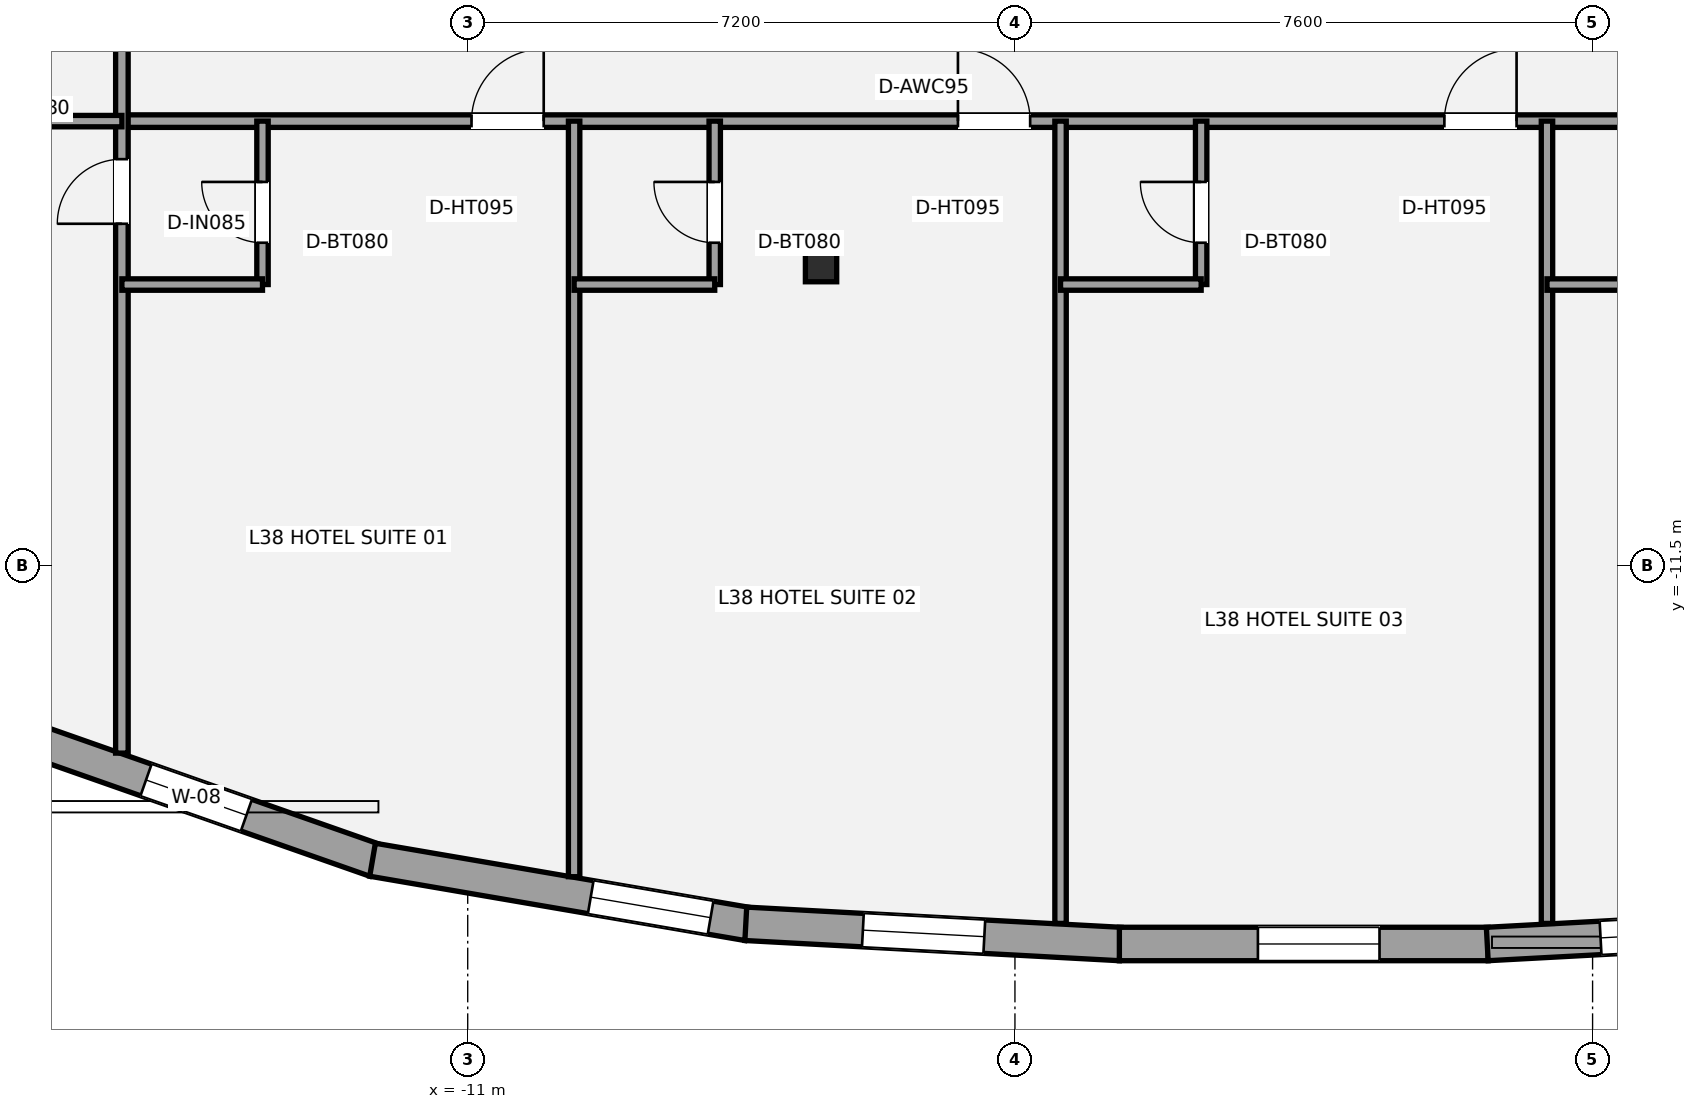
"""IFC4 building model, lengths in metres.
Left out: names, types, materials, properties, quantities, classifications, styles, units other than length and angle.
Written with IfcOpenShell. Run it as: python <this file> out.ifc"""

import sys

from ifc_helpers import new_model, si_unit, direction, frame, frame_2d, origin, origin_2d, place, context, subcontext, project, spatial, rectangle, i_section, extrude, element, fill, save


model = new_model("IFC4")
c1 = context("Model", 3, precision=1e-05, world=origin(), true_north=direction((0.0, 1.0)))
c2 = subcontext(c1, "Body", "Model", "MODEL_VIEW")
j1 = project(units=[si_unit("LENGTHUNIT", "METRE"), si_unit("PLANEANGLEUNIT", "RADIAN")], contexts=[c1])
p1 = place(None, origin())
s1 = spatial("IfcSite", under=j1, at=p1, CompositionType="ELEMENT")
p2 = place(p1, origin())
s2 = spatial("IfcBuilding", under=s1, at=p2, CompositionType="ELEMENT")
p3 = place(p2, frame((0.0, 0.0, 143.8)))
s3 = spatial("IfcBuildingStorey", under=s2, at=p3, CompositionType="ELEMENT", Elevation=143.8)
p4 = place(p3, frame((-6.351, -7.546, 0.0), z_axis=(0.0, 0.0, 1.0), x_axis=(1.0, 0.0, 0.0)))
e1 = element("IfcColumn", 1, at=p4, inside=s3, PredefinedType="COLUMN", context=c2, shape_type="SweptSolid", body=[
    extrude(i_section(OverallWidth=0.412, OverallDepth=0.435, WebThickness=0.036, FlangeThickness=0.057, at=origin_2d()), origin(), (0.0, 0.0, 1.0), 3.2),
])
p5 = place(p3, frame((-12.216, -15.377, 0.0), z_axis=(0.0, 0.0, 1.0), x_axis=(-0.943528860281, 0.331290340662, 0.0)))
e2 = element("IfcWall", 2, at=p5, inside=s3, PredefinedType="STANDARD", context=c2, shape_type="SweptSolid", body=[
    extrude(rectangle(XDim=4.893, YDim=0.44, at=frame_2d((2.447, 0.0))), origin(), (0.0, 0.0, 1.0), 2.315),
])
p6 = place(p5, frame((1.796, 0.0, 0.58)))
e3 = element("IfcOpeningElement", 3, at=p6, cuts=e2, PredefinedType="OPENING", context=c2, shape_type="SweptSolid", body=[
    extrude(rectangle(XDim=1.4, YDim=1.55, at=frame_2d((0.7, 0.775))), frame((0.0, 0.23, 0.0), z_axis=(0.0, -1.0, 0.0), x_axis=(1.0, 0.0, 0.0)), (0.0, 0.0, 1.0), 0.46),
])
p7 = place(p3, frame((-7.316, -16.213, 0.0), z_axis=(0.0, 0.0, 1.0), x_axis=(-0.985640803986, 0.168855575915, 0.0)))
e4 = element("IfcWall", 4, at=p7, inside=s3, PredefinedType="STANDARD", context=c2, shape_type="SweptSolid", body=[
    extrude(rectangle(XDim=5.009, YDim=0.44, at=frame_2d((2.504, 0.0))), origin(), (0.0, 0.0, 1.0), 2.315),
])
p8 = place(p7, frame((0.496, 0.0, 0.58)))
e5 = element("IfcOpeningElement", 5, at=p8, cuts=e4, PredefinedType="OPENING", context=c2, shape_type="SweptSolid", body=[
    extrude(rectangle(XDim=1.6, YDim=1.55, at=frame_2d((0.8, 0.775))), frame((0.0, 0.23, 0.0), z_axis=(0.0, -1.0, 0.0), x_axis=(1.0, 0.0, 0.0)), (0.0, 0.0, 1.0), 0.46),
])
p9 = place(p3, frame((-2.414, -16.476, 0.0), z_axis=(0.0, 0.0, 1.0), x_axis=(-0.998547098553, 0.05388591627, 0.0)))
e6 = element("IfcWall", 6, at=p9, inside=s3, PredefinedType="STANDARD", context=c2, shape_type="SweptSolid", body=[
    extrude(rectangle(XDim=4.934, YDim=0.44, at=frame_2d((2.467, 0.0))), origin(), (0.0, 0.0, 1.0), 2.315),
])
p10 = place(p9, frame((1.792, 0.0, 0.58)))
e7 = element("IfcOpeningElement", 7, at=p10, cuts=e6, PredefinedType="OPENING", context=c2, shape_type="SweptSolid", body=[
    extrude(rectangle(XDim=1.6, YDim=1.55, at=frame_2d((0.8, 0.775))), frame((0.0, 0.23, 0.0), z_axis=(0.0, -1.0, 0.0), x_axis=(1.0, 0.0, 0.0)), (0.0, 0.0, 1.0), 0.46),
])
p11 = place(p3, frame((2.426, -16.476, 0.0), z_axis=(0.0, 0.0, 1.0), x_axis=(-1.0, 0.0, 0.0)))
e8 = element("IfcWall", 8, at=p11, inside=s3, PredefinedType="STANDARD", context=c2, shape_type="SweptSolid", body=[
    extrude(rectangle(XDim=4.852, YDim=0.44, at=frame_2d((2.426, 0.0))), origin(), (0.0, 0.0, 1.0), 2.315),
])
p12 = place(p11, frame((1.429, 0.0, 0.58)))
e9 = element("IfcOpeningElement", 9, at=p12, cuts=e8, PredefinedType="OPENING", context=c2, shape_type="SweptSolid", body=[
    extrude(rectangle(XDim=1.6, YDim=1.55, at=frame_2d((0.8, 0.775))), frame((0.0, 0.23, 0.0), z_axis=(0.0, -1.0, 0.0), x_axis=(1.0, 0.0, 0.0)), (0.0, 0.0, 1.0), 0.46),
])
p13 = place(p3, frame((7.341, -16.21, 0.0), z_axis=(0.0, 0.0, 1.0), x_axis=(-0.998547098553, -0.05388591627, 0.0)))
e10 = element("IfcWall", 10, at=p13, inside=s3, PredefinedType="STANDARD", context=c2, shape_type="SweptSolid", body=[
    extrude(rectangle(XDim=4.934, YDim=0.44, at=frame_2d((2.467, 0.0))), origin(), (0.0, 0.0, 1.0), 2.315),
])
p14 = place(p13, frame((1.841, 0.0, 0.58)))
e11 = element("IfcOpeningElement", 11, at=p14, cuts=e10, PredefinedType="OPENING", context=c2, shape_type="SweptSolid", body=[
    extrude(rectangle(XDim=1.6, YDim=1.55, at=frame_2d((0.8, 0.775))), frame((0.0, 0.23, 0.0), z_axis=(0.0, -1.0, 0.0), x_axis=(1.0, 0.0, 0.0)), (0.0, 0.0, 1.0), 0.46),
])
p15 = place(p3, frame((-15.55, -5.65, 0.0), z_axis=(0.0, 0.0, 1.0), x_axis=(1.0, 0.0, 0.0)))
e12 = element("IfcWall", 12, at=p15, inside=s3, PredefinedType="PARTITIONING", context=c2, shape_type="SweptSolid", body=[
    extrude(rectangle(XDim=31.1, YDim=0.165, at=frame_2d((15.55, 0.0))), origin(), (0.0, 0.0, 1.0), 2.398),
])
p16 = place(p15, frame((4.6, 0.0, 0.0)))
e13 = element("IfcOpeningElement", 13, at=p16, cuts=e12, PredefinedType="OPENING", context=c2, shape_type="SweptSolid", body=[
    extrude(rectangle(XDim=0.95, YDim=2.15, at=frame_2d((0.475, 1.075))), frame((0.0, 0.093, 0.0), z_axis=(0.0, -1.0, 0.0), x_axis=(1.0, 0.0, 0.0)), (0.0, 0.0, 1.0), 0.185),
])
p17 = place(p15, frame((11.0, 0.0, 0.0)))
e14 = element("IfcOpeningElement", 14, at=p17, cuts=e12, PredefinedType="OPENING", context=c2, shape_type="SweptSolid", body=[
    extrude(rectangle(XDim=0.95, YDim=2.15, at=frame_2d((0.475, 1.075))), frame((0.0, 0.093, 0.0), z_axis=(0.0, -1.0, 0.0), x_axis=(1.0, 0.0, 0.0)), (0.0, 0.0, 1.0), 0.185),
])
p18 = place(p15, frame((17.4, 0.0, 0.0)))
e15 = element("IfcOpeningElement", 15, at=p18, cuts=e12, PredefinedType="OPENING", context=c2, shape_type="SweptSolid", body=[
    extrude(rectangle(XDim=0.95, YDim=2.15, at=frame_2d((0.475, 1.075))), frame((0.0, 0.093, 0.0), z_axis=(0.0, -1.0, 0.0), x_axis=(1.0, 0.0, 0.0)), (0.0, 0.0, 1.0), 0.185),
])
p19 = place(p15, frame((23.8, 0.0, 0.0)))
e16 = element("IfcOpeningElement", 16, at=p19, cuts=e12, PredefinedType="OPENING", context=c2, shape_type="SweptSolid", body=[
    extrude(rectangle(XDim=0.95, YDim=2.15, at=frame_2d((0.475, 1.075))), frame((0.0, 0.093, 0.0), z_axis=(0.0, -1.0, 0.0), x_axis=(1.0, 0.0, 0.0)), (0.0, 0.0, 1.0), 0.185),
])
p20 = place(p15, frame((29.75, 0.0, 0.0)))
e17 = element("IfcOpeningElement", 17, at=p20, cuts=e12, PredefinedType="OPENING", context=c2, shape_type="SweptSolid", body=[
    extrude(rectangle(XDim=0.95, YDim=2.15, at=frame_2d((0.475, 1.075))), frame((0.0, 0.093, 0.0), z_axis=(0.0, -1.0, 0.0), x_axis=(1.0, 0.0, 0.0)), (0.0, 0.0, 1.0), 0.185),
])
p21 = place(p3, frame((-15.55, -13.965, 0.0), z_axis=(0.0, 0.0, 1.0), x_axis=(0.0, 1.0, 0.0)))
e18 = element("IfcWall", 18, at=p21, inside=s3, PredefinedType="PARTITIONING", context=c2, shape_type="SweptSolid", body=[
    extrude(rectangle(XDim=21.515, YDim=0.165, at=frame_2d((10.757, 0.0))), origin(), (0.0, 0.0, 1.0), 2.473),
])
p22 = place(p21, frame((6.964, 0.0, 0.0)))
e19 = element("IfcOpeningElement", 19, at=p22, cuts=e18, PredefinedType="OPENING", context=c2, shape_type="SweptSolid", body=[
    extrude(rectangle(XDim=0.85, YDim=2.1, at=frame_2d((0.425, 1.05))), frame((0.0, 0.093, 0.0), z_axis=(0.0, -1.0, 0.0), x_axis=(1.0, 0.0, 0.0)), (0.0, 0.0, 1.0), 0.185),
])
p23 = place(p21, frame((11.014, 0.0, 0.0)))
e20 = element("IfcOpeningElement", 20, at=p23, cuts=e18, PredefinedType="OPENING", context=c2, shape_type="SweptSolid", body=[
    extrude(rectangle(XDim=0.95, YDim=2.15, at=frame_2d((0.475, 1.075))), frame((0.0, 0.093, 0.0), z_axis=(0.0, -1.0, 0.0), x_axis=(1.0, 0.0, 0.0)), (0.0, 0.0, 1.0), 0.185),
])
p24 = place(p21, frame((15.414, 0.0, 0.0)))
e21 = element("IfcOpeningElement", 21, at=p24, cuts=e18, PredefinedType="OPENING", context=c2, shape_type="SweptSolid", body=[
    extrude(rectangle(XDim=0.95, YDim=2.15, at=frame_2d((0.475, 1.075))), frame((0.0, 0.093, 0.0), z_axis=(0.0, -1.0, 0.0), x_axis=(1.0, 0.0, 0.0)), (0.0, 0.0, 1.0), 0.185),
])
p25 = place(p21, frame((20.165, 0.0, 0.0)))
e22 = element("IfcOpeningElement", 22, at=p25, cuts=e18, PredefinedType="OPENING", context=c2, shape_type="SweptSolid", body=[
    extrude(rectangle(XDim=0.95, YDim=2.15, at=frame_2d((0.475, 1.075))), frame((0.0, 0.093, 0.0), z_axis=(0.0, -1.0, 0.0), x_axis=(1.0, 0.0, 0.0)), (0.0, 0.0, 1.0), 0.185),
])
p26 = place(p3, frame((-23.513, -5.65, 0.0), z_axis=(0.0, 0.0, 1.0), x_axis=(1.0, 0.0, 0.0)))
e23 = element("IfcWall", 23, at=p26, inside=s3, PredefinedType="PLUMBINGWALL", context=c2, shape_type="SweptSolid", body=[
    extrude(rectangle(XDim=7.963, YDim=0.15, at=frame_2d((3.981, 0.0))), origin(), (0.0, 0.0, 1.0), 2.473),
])
p27 = place(p3, frame((-9.6, -15.591, 0.0), z_axis=(0.0, 0.0, 1.0), x_axis=(0.0, 1.0, 0.0)))
e24 = element("IfcWall", 24, at=p27, inside=s3, PredefinedType="PLUMBINGWALL", context=c2, shape_type="SweptSolid", body=[
    extrude(rectangle(XDim=9.941, YDim=0.15, at=frame_2d((4.97, 0.0))), origin(), (0.0, 0.0, 1.0), 3.02),
])
for number, where, z_axis, x_axis in (
    (25, (-3.2, -16.205, 0.0), (0.0, 0.0, 1.0), (0.0, 1.0, 0.0)),
    (26, (3.2, -16.205, 0.0), (0.0, 0.0, 1.0), (0.0, 1.0, 0.0)),
):
    element("IfcWall", number, at=place(p3, frame(where, z_axis=z_axis, x_axis=x_axis)), inside=s3, PredefinedType="PLUMBINGWALL", context=c2, shape_type="SweptSolid", body=[
        extrude(rectangle(XDim=10.555, YDim=0.15, at=frame_2d((5.278, 0.0))), origin(), (0.0, 0.0, 1.0), 2.473),
    ])
p28 = place(p3, frame((-13.7, -7.8, 0.0), z_axis=(0.0, 0.0, 1.0), x_axis=(0.0, 1.0, 0.0)))
e27 = element("IfcWall", 27, at=p28, inside=s3, PredefinedType="PLUMBINGWALL", context=c2, shape_type="SweptSolid", body=[
    extrude(rectangle(XDim=2.15, YDim=0.15, at=frame_2d((1.075, 0.0))), origin(), (0.0, 0.0, 1.0), 3.02),
])
p29 = place(p28, frame((0.55, 0.0, 0.0)))
e28 = element("IfcOpeningElement", 28, at=p29, cuts=e27, PredefinedType="OPENING", context=c2, shape_type="SweptSolid", body=[
    extrude(rectangle(XDim=0.8, YDim=2.1, at=frame_2d((0.4, 1.05))), frame((0.0, 0.085, 0.0), z_axis=(0.0, -1.0, 0.0), x_axis=(1.0, 0.0, 0.0)), (0.0, 0.0, 1.0), 0.17),
])
p30 = place(p3, frame((-15.55, -7.8, 0.0), z_axis=(0.0, 0.0, 1.0), x_axis=(1.0, 0.0, 0.0)))
e29 = element("IfcWall", 29, at=p30, inside=s3, PredefinedType="PLUMBINGWALL", context=c2, shape_type="SweptSolid", body=[
    extrude(rectangle(XDim=1.85, YDim=0.15, at=frame_2d((0.925, 0.0))), origin(), (0.0, 0.0, 1.0), 3.02),
])
p31 = place(p3, frame((-7.75, -7.8, 0.0), z_axis=(0.0, 0.0, 1.0), x_axis=(0.0, 1.0, 0.0)))
e30 = element("IfcWall", 30, at=p31, inside=s3, PredefinedType="PLUMBINGWALL", context=c2, shape_type="SweptSolid", body=[
    extrude(rectangle(XDim=2.15, YDim=0.15, at=frame_2d((1.075, 0.0))), origin(), (0.0, 0.0, 1.0), 3.02),
])
p32 = place(p31, frame((0.55, 0.0, 0.0)))
e31 = element("IfcOpeningElement", 31, at=p32, cuts=e30, PredefinedType="OPENING", context=c2, shape_type="SweptSolid", body=[
    extrude(rectangle(XDim=0.8, YDim=2.1, at=frame_2d((0.4, 1.05))), frame((0.0, 0.085, 0.0), z_axis=(0.0, -1.0, 0.0), x_axis=(1.0, 0.0, 0.0)), (0.0, 0.0, 1.0), 0.17),
])
p33 = place(p3, frame((-9.6, -7.8, 0.0), z_axis=(0.0, 0.0, 1.0), x_axis=(1.0, 0.0, 0.0)))
e32 = element("IfcWall", 32, at=p33, inside=s3, PredefinedType="PLUMBINGWALL", context=c2, shape_type="SweptSolid", body=[
    extrude(rectangle(XDim=1.85, YDim=0.15, at=frame_2d((0.925, 0.0))), origin(), (0.0, 0.0, 1.0), 3.02),
])
p34 = place(p3, frame((-1.35, -7.8, 0.0), z_axis=(0.0, 0.0, 1.0), x_axis=(0.0, 1.0, 0.0)))
e33 = element("IfcWall", 33, at=p34, inside=s3, PredefinedType="PLUMBINGWALL", context=c2, shape_type="SweptSolid", body=[
    extrude(rectangle(XDim=2.15, YDim=0.15, at=frame_2d((1.075, 0.0))), origin(), (0.0, 0.0, 1.0), 2.473),
])
p35 = place(p34, frame((0.55, 0.0, 0.0)))
e34 = element("IfcOpeningElement", 34, at=p35, cuts=e33, PredefinedType="OPENING", context=c2, shape_type="SweptSolid", body=[
    extrude(rectangle(XDim=0.8, YDim=2.1, at=frame_2d((0.4, 1.05))), frame((0.0, 0.085, 0.0), z_axis=(0.0, -1.0, 0.0), x_axis=(1.0, 0.0, 0.0)), (0.0, 0.0, 1.0), 0.17),
])
p36 = place(p3, frame((-3.2, -7.8, 0.0), z_axis=(0.0, 0.0, 1.0), x_axis=(1.0, 0.0, 0.0)))
e35 = element("IfcWall", 35, at=p36, inside=s3, PredefinedType="PLUMBINGWALL", context=c2, shape_type="SweptSolid", body=[
    extrude(rectangle(XDim=1.85, YDim=0.15, at=frame_2d((0.925, 0.0))), origin(), (0.0, 0.0, 1.0), 3.02),
])
p37 = place(p3, frame((3.2, -7.8, 0.0), z_axis=(0.0, 0.0, 1.0), x_axis=(1.0, 0.0, 0.0)))
e36 = element("IfcWall", 36, at=p37, inside=s3, PredefinedType="PLUMBINGWALL", context=c2, shape_type="SweptSolid", body=[
    extrude(rectangle(XDim=1.85, YDim=0.15, at=frame_2d((0.925, 0.0))), origin(), (0.0, 0.0, 1.0), 3.02),
])
p38 = place(p6, origin())
e37 = element("IfcWindow", 37, at=p38, inside=s3, PartitioningType="SINGLE_PANEL", PredefinedType="WINDOW", context=c2, shape_type="SweptSolid", body=[
    extrude(rectangle(XDim=1.4, YDim=1.55, at=frame_2d((0.7, 0.775))), frame((0.0, -0.01, 0.0), z_axis=(0.0, -1.0, 0.0), x_axis=(1.0, 0.0, 0.0)), (0.0, 0.0, 1.0), 0.06),
])
fill(e3, e37)
p39 = place(p8, origin())
e38 = element("IfcWindow", 38, at=p39, inside=s3, PartitioningType="SINGLE_PANEL", PredefinedType="WINDOW", context=c2, shape_type="SweptSolid", body=[
    extrude(rectangle(XDim=1.6, YDim=1.55, at=frame_2d((0.8, 0.775))), frame((0.0, -0.01, 0.0), z_axis=(0.0, -1.0, 0.0), x_axis=(1.0, 0.0, 0.0)), (0.0, 0.0, 1.0), 0.06),
])
fill(e5, e38)
p40 = place(p10, origin())
e39 = element("IfcWindow", 39, at=p40, inside=s3, PartitioningType="SINGLE_PANEL", PredefinedType="WINDOW", context=c2, shape_type="SweptSolid", body=[
    extrude(rectangle(XDim=1.6, YDim=1.55, at=frame_2d((0.8, 0.775))), frame((0.0, -0.01, 0.0), z_axis=(0.0, -1.0, 0.0), x_axis=(1.0, 0.0, 0.0)), (0.0, 0.0, 1.0), 0.06),
])
fill(e7, e39)
p41 = place(p12, origin())
e40 = element("IfcWindow", 40, at=p41, inside=s3, PartitioningType="SINGLE_PANEL", PredefinedType="WINDOW", context=c2, shape_type="SweptSolid", body=[
    extrude(rectangle(XDim=1.6, YDim=1.55, at=frame_2d((0.8, 0.775))), frame((0.0, -0.01, 0.0), z_axis=(0.0, -1.0, 0.0), x_axis=(1.0, 0.0, 0.0)), (0.0, 0.0, 1.0), 0.06),
])
fill(e9, e40)
p42 = place(p14, origin())
e41 = element("IfcWindow", 41, at=p42, inside=s3, PartitioningType="SINGLE_PANEL", PredefinedType="WINDOW", context=c2, shape_type="SweptSolid", body=[
    extrude(rectangle(XDim=1.6, YDim=1.55, at=frame_2d((0.8, 0.775))), frame((0.0, -0.01, 0.0), z_axis=(0.0, -1.0, 0.0), x_axis=(1.0, 0.0, 0.0)), (0.0, 0.0, 1.0), 0.06),
])
fill(e11, e41)
p43 = place(p22, origin())
e42 = element("IfcDoor", 42, at=p43, inside=s3, OperationType="SINGLE_SWING_LEFT", PredefinedType="DOOR", context=c2, shape_type="SweptSolid", body=[
    extrude(rectangle(XDim=0.85, YDim=2.1, at=frame_2d((0.425, 1.05))), frame((0.0, 0.025, 0.0), z_axis=(0.0, -1.0, 0.0), x_axis=(1.0, 0.0, 0.0)), (0.0, 0.0, 1.0), 0.05),
])
fill(e19, e42)
p44 = place(p16, origin())
e43 = element("IfcDoor", 43, at=p44, inside=s3, OperationType="SINGLE_SWING_RIGHT", PredefinedType="DOOR", context=c2, shape_type="SweptSolid", body=[
    extrude(rectangle(XDim=0.95, YDim=2.15, at=frame_2d((0.475, 1.075))), frame((0.0, 0.025, 0.0), z_axis=(0.0, -1.0, 0.0), x_axis=(1.0, 0.0, 0.0)), (0.0, 0.0, 1.0), 0.05),
])
fill(e13, e43)
p45 = place(p29, origin())
e44 = element("IfcDoor", 44, at=p45, inside=s3, OperationType="SINGLE_SWING_RIGHT", PredefinedType="DOOR", context=c2, shape_type="SweptSolid", body=[
    extrude(rectangle(XDim=0.8, YDim=2.1, at=frame_2d((0.4, 1.05))), frame((0.0, 0.025, 0.0), z_axis=(0.0, -1.0, 0.0), x_axis=(1.0, 0.0, 0.0)), (0.0, 0.0, 1.0), 0.05),
])
fill(e28, e44)
p46 = place(p17, origin())
e45 = element("IfcDoor", 45, at=p46, inside=s3, OperationType="SINGLE_SWING_LEFT", PredefinedType="DOOR", context=c2, shape_type="SweptSolid", body=[
    extrude(rectangle(XDim=0.95, YDim=2.15, at=frame_2d((0.475, 1.075))), frame((0.0, 0.025, 0.0), z_axis=(0.0, -1.0, 0.0), x_axis=(1.0, 0.0, 0.0)), (0.0, 0.0, 1.0), 0.05),
])
fill(e14, e45)
p47 = place(p32, origin())
e46 = element("IfcDoor", 46, at=p47, inside=s3, OperationType="SINGLE_SWING_RIGHT", PredefinedType="DOOR", context=c2, shape_type="SweptSolid", body=[
    extrude(rectangle(XDim=0.8, YDim=2.1, at=frame_2d((0.4, 1.05))), frame((0.0, 0.025, 0.0), z_axis=(0.0, -1.0, 0.0), x_axis=(1.0, 0.0, 0.0)), (0.0, 0.0, 1.0), 0.05),
])
fill(e31, e46)
p48 = place(p18, origin())
e47 = element("IfcDoor", 47, at=p48, inside=s3, OperationType="SINGLE_SWING_RIGHT", PredefinedType="DOOR", context=c2, shape_type="SweptSolid", body=[
    extrude(rectangle(XDim=0.95, YDim=2.15, at=frame_2d((0.475, 1.075))), frame((0.0, 0.025, 0.0), z_axis=(0.0, -1.0, 0.0), x_axis=(1.0, 0.0, 0.0)), (0.0, 0.0, 1.0), 0.05),
])
fill(e15, e47)
p49 = place(p35, origin())
e48 = element("IfcDoor", 48, at=p49, inside=s3, OperationType="SINGLE_SWING_RIGHT", PredefinedType="DOOR", context=c2, shape_type="SweptSolid", body=[
    extrude(rectangle(XDim=0.8, YDim=2.1, at=frame_2d((0.4, 1.05))), frame((0.0, 0.025, 0.0), z_axis=(0.0, -1.0, 0.0), x_axis=(1.0, 0.0, 0.0)), (0.0, 0.0, 1.0), 0.05),
])
fill(e34, e48)
save(model, sys.argv[1])
